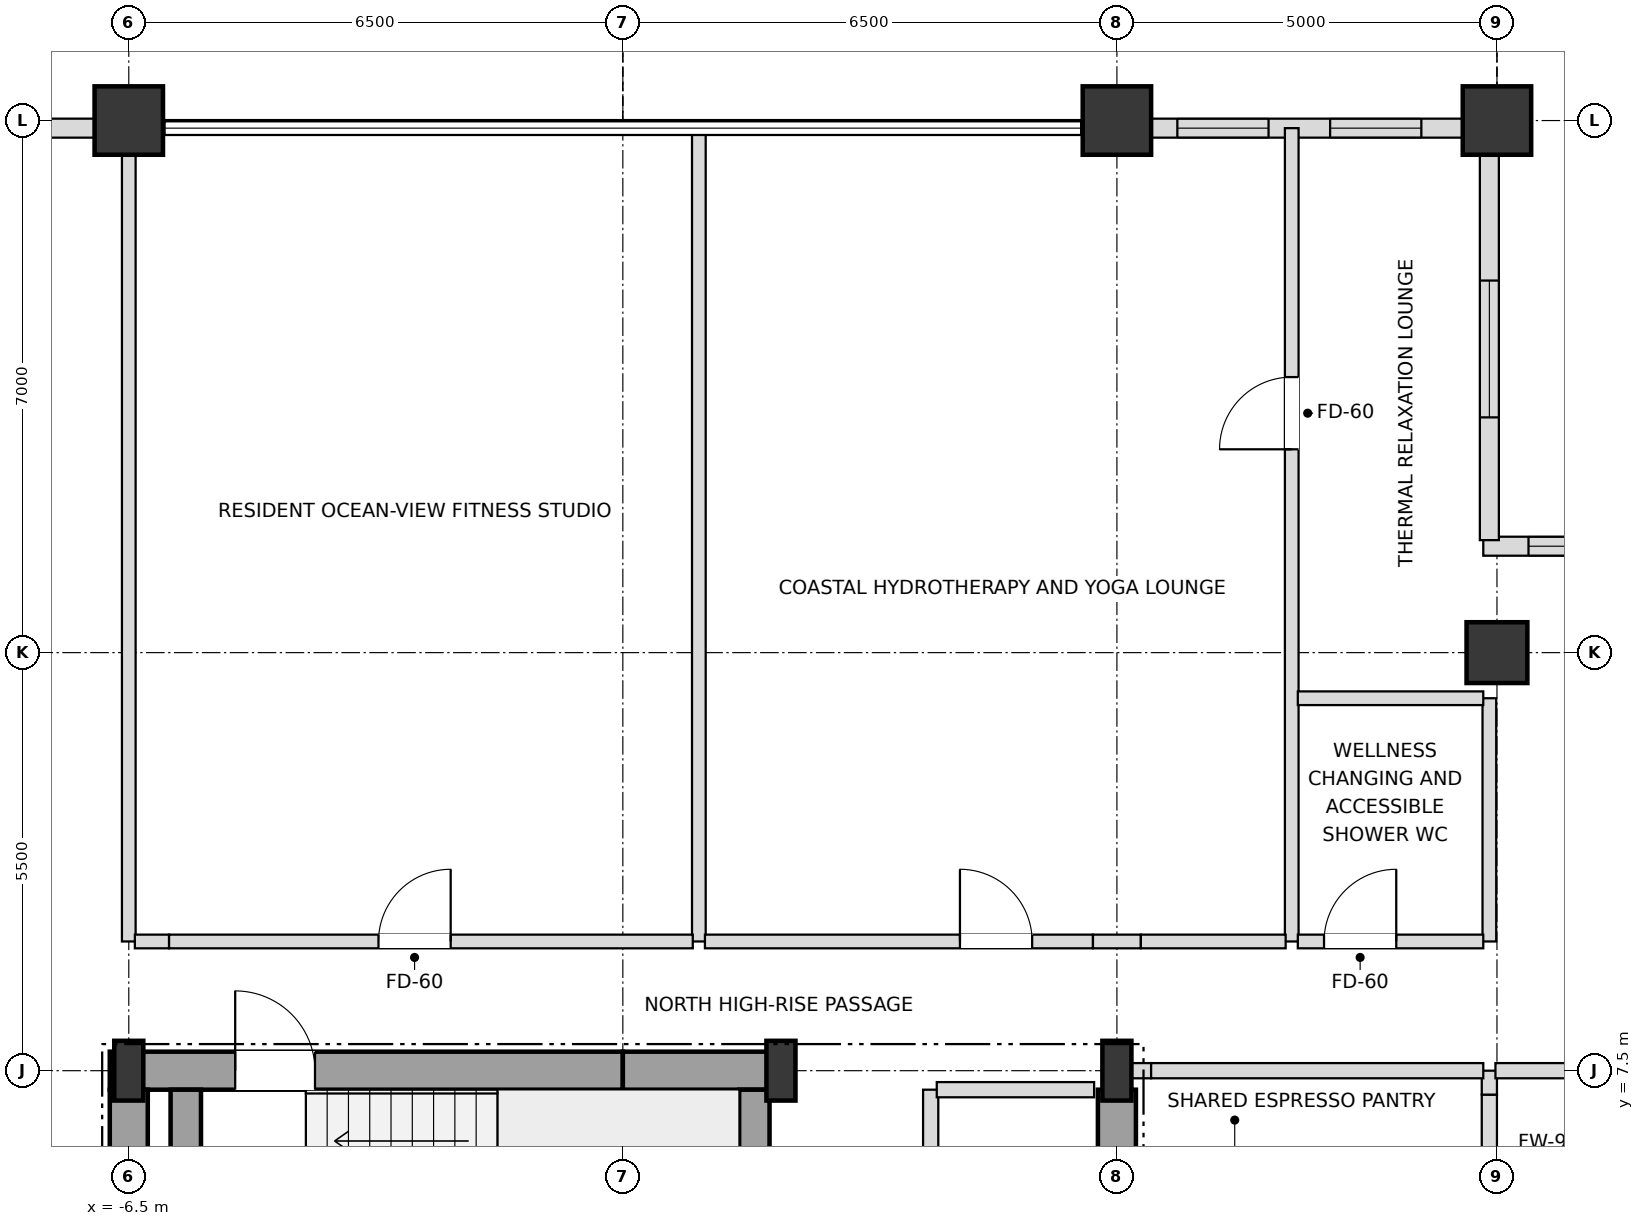
"""IFC4 building model, lengths in metres.
Left out: names, types, materials, properties, quantities, classifications, styles, units other than length and angle.
Written with IfcOpenShell. Run it as: python <this file> out.ifc"""

import sys

from ifc_helpers import new_model, si_unit, direction, frame, frame_2d, origin, origin_2d, place, context, subcontext, project, spatial, rectangle, i_section, extrude, element, fill, save


model = new_model("IFC4")
c1 = context("Model", 3, precision=1e-05, world=origin(), true_north=direction((0.0, 1.0)))
c2 = subcontext(c1, "Body", "Model", "MODEL_VIEW")
j1 = project(units=[si_unit("LENGTHUNIT", "METRE"), si_unit("PLANEANGLEUNIT", "RADIAN")], contexts=[c1])
p1 = place(None, origin())
s1 = spatial("IfcSite", under=j1, at=p1, CompositionType="ELEMENT")
p2 = place(p1, origin())
s2 = spatial("IfcBuilding", under=s1, at=p2, CompositionType="ELEMENT")
p3 = place(p2, frame((0.0, 0.0, 301.5)))
s3 = spatial("IfcBuildingStorey", under=s2, at=p3, CompositionType="ELEMENT", Elevation=301.5)
for number, where, z_axis, x_axis in (
    (1, (-6.5, 7.5, 0.0), (0.0, 0.0, 1.0), (1.0, 0.0, 0.0)),
    (2, (2.08, 7.5, 0.0), (0.0, 0.0, 1.0), (1.0, 0.0, 0.0)),
    (3, (6.5, 7.5, 0.0), (0.0, 0.0, 1.0), (1.0, 0.0, 0.0)),
):
    element("IfcColumn", number, at=place(p3, frame(where, z_axis=z_axis, x_axis=x_axis)), inside=s3, PredefinedType="COLUMN", context=c2, shape_type="SweptSolid", body=[
        extrude(i_section(OverallWidth=0.382, OverallDepth=0.786, WebThickness=0.02, FlangeThickness=0.033, at=origin_2d()), origin(), (0.0, 0.0, 1.0), 3.6),
    ])
for number, where, z_axis, x_axis in (
    (4, (11.5, 20.0, 0.0), (0.0, 0.0, 1.0), (1.0, 0.0, 0.0)),
    (5, (6.5, 20.0, 0.0), (0.0, 0.0, 1.0), (1.0, 0.0, 0.0)),
    (6, (-6.5, 20.0, 0.0), (0.0, 0.0, 1.0), (1.0, 0.0, 0.0)),
):
    element("IfcColumn", number, at=place(p3, frame(where, z_axis=z_axis, x_axis=x_axis)), inside=s3, PredefinedType="USERDEFINED", context=c2, shape_type="SweptSolid", body=[
        extrude(rectangle(XDim=0.9, YDim=0.9, at=origin_2d()), origin(), (0.0, 0.0, 1.0), 3.6),
    ])
p4 = place(p3, frame((11.5, 13.0, 0.0), z_axis=(0.0, 0.0, 1.0), x_axis=(1.0, 0.0, 0.0)))
e7 = element("IfcColumn", 7, at=p4, inside=s3, PredefinedType="COLUMN", context=c2, shape_type="SweptSolid", body=[
    extrude(rectangle(XDim=0.8, YDim=0.8, at=origin_2d()), origin(), (0.0, 0.0, 1.0), 3.6),
])
p5 = place(p3, frame((11.055, 19.9, 0.0), z_axis=(0.0, 0.0, 1.0), x_axis=(-1.0, 0.0, 0.0)))
e8 = element("IfcWall", 8, at=p5, inside=s3, PredefinedType="SOLIDWALL", context=c2, shape_type="SweptSolid", body=[
    extrude(rectangle(XDim=4.11, YDim=0.25, at=frame_2d((2.055, 0.0))), origin(), (0.0, 0.0, 1.0), 2.668),
])
p6 = place(p5, frame((0.55, 0.0, 0.72)))
e9 = element("IfcOpeningElement", 9, at=p6, cuts=e8, PredefinedType="OPENING", context=c2, shape_type="SweptSolid", body=[
    extrude(rectangle(XDim=1.2, YDim=1.68, at=frame_2d((0.6, 0.84))), frame((0.0, 0.135, 0.0), z_axis=(0.0, -1.0, 0.0), x_axis=(1.0, 0.0, 0.0)), (0.0, 0.0, 1.0), 0.27),
])
p7 = place(p5, frame((2.56, 0.0, 0.72)))
e10 = element("IfcOpeningElement", 10, at=p7, cuts=e8, PredefinedType="OPENING", context=c2, shape_type="SweptSolid", body=[
    extrude(rectangle(XDim=1.2, YDim=1.68, at=frame_2d((0.6, 0.84))), frame((0.0, 0.135, 0.0), z_axis=(0.0, -1.0, 0.0), x_axis=(1.0, 0.0, 0.0)), (0.0, 0.0, 1.0), 0.27),
])
p8 = place(p3, frame((-6.945, 19.9, 0.0), z_axis=(0.0, 0.0, 1.0), x_axis=(-1.0, 0.0, 0.0)))
e11 = element("IfcWall", 11, at=p8, inside=s3, PredefinedType="SOLIDWALL", context=c2, shape_type="SweptSolid", body=[
    extrude(rectangle(XDim=4.11, YDim=0.25, at=frame_2d((2.055, 0.0))), origin(), (0.0, 0.0, 1.0), 2.668),
])
p9 = place(p8, frame((1.155, 0.0, 0.72)))
e12 = element("IfcOpeningElement", 12, at=p9, cuts=e11, PredefinedType="OPENING", context=c2, shape_type="SweptSolid", body=[
    extrude(rectangle(XDim=1.8, YDim=1.68, at=frame_2d((0.9, 0.84))), frame((0.0, 0.135, 0.0), z_axis=(0.0, -1.0, 0.0), x_axis=(1.0, 0.0, 0.0)), (0.0, 0.0, 1.0), 0.27),
])
p10 = place(p3, frame((16.98, 14.4, 0.0), z_axis=(0.0, 0.0, 1.0), x_axis=(-1.0, 0.0, 0.0)))
e13 = element("IfcWall", 13, at=p10, inside=s3, PredefinedType="SOLIDWALL", context=c2, shape_type="SweptSolid", body=[
    extrude(rectangle(XDim=5.66, YDim=0.25, at=frame_2d((2.83, 0.0))), origin(), (0.0, 0.0, 1.0), 2.668),
])
p11 = place(p10, frame((0.595, 0.0, 0.72)))
e14 = element("IfcOpeningElement", 14, at=p11, cuts=e13, PredefinedType="OPENING", context=c2, shape_type="SweptSolid", body=[
    extrude(rectangle(XDim=1.8, YDim=1.68, at=frame_2d((0.9, 0.84))), frame((0.0, 0.135, 0.0), z_axis=(0.0, -1.0, 0.0), x_axis=(1.0, 0.0, 0.0)), (0.0, 0.0, 1.0), 0.27),
])
p12 = place(p10, frame((3.265, 0.0, 0.72)))
e15 = element("IfcOpeningElement", 15, at=p12, cuts=e13, PredefinedType="OPENING", context=c2, shape_type="SweptSolid", body=[
    extrude(rectangle(XDim=1.8, YDim=1.68, at=frame_2d((0.9, 0.84))), frame((0.0, 0.135, 0.0), z_axis=(0.0, -1.0, 0.0), x_axis=(1.0, 0.0, 0.0)), (0.0, 0.0, 1.0), 0.27),
])
p13 = place(p3, frame((11.4, 14.48, 0.0), z_axis=(0.0, 0.0, 1.0), x_axis=(0.0, 1.0, 0.0)))
e16 = element("IfcWall", 16, at=p13, inside=s3, PredefinedType="SOLIDWALL", context=c2, shape_type="SweptSolid", body=[
    extrude(rectangle(XDim=5.34, YDim=0.25, at=frame_2d((2.67, 0.0))), origin(), (0.0, 0.0, 1.0), 2.668),
])
p14 = place(p13, frame((1.615, 0.0, 0.72)))
e17 = element("IfcOpeningElement", 17, at=p14, cuts=e16, PredefinedType="OPENING", context=c2, shape_type="SweptSolid", body=[
    extrude(rectangle(XDim=1.8, YDim=1.68, at=frame_2d((0.9, 0.84))), frame((0.0, 0.135, 0.0), z_axis=(0.0, -1.0, 0.0), x_axis=(1.0, 0.0, 0.0)), (0.0, 0.0, 1.0), 0.27),
])
p15 = place(p3, frame((-6.75, 7.5, 0.0), z_axis=(0.0, 0.0, 1.0), x_axis=(1.0, 0.0, 0.0)))
e18 = element("IfcWall", 18, at=p15, inside=s3, PredefinedType="SHEAR", context=c2, shape_type="SweptSolid", body=[
    extrude(rectangle(XDim=6.75, YDim=0.5, at=frame_2d((3.375, 0.0))), origin(), (0.0, 0.0, 1.0), 3.3),
])
p16 = place(p15, frame((1.65, 0.0, 0.0)))
e19 = element("IfcOpeningElement", 19, at=p16, cuts=e18, PredefinedType="OPENING", context=c2, shape_type="SweptSolid", body=[
    extrude(rectangle(XDim=1.05, YDim=2.15, at=frame_2d((0.525, 1.075))), frame((0.0, 0.26, 0.0), z_axis=(0.0, -1.0, 0.0), x_axis=(1.0, 0.0, 0.0)), (0.0, 0.0, 1.0), 0.52),
])
p17 = place(p3, frame((0.0, 7.5, 0.0), z_axis=(0.0, 0.0, 1.0), x_axis=(1.0, 0.0, 0.0)))
e20 = element("IfcWall", 20, at=p17, inside=s3, PredefinedType="SHEAR", context=c2, shape_type="SweptSolid", body=[
    extrude(rectangle(XDim=2.08, YDim=0.5, at=frame_2d((1.04, 0.0))), origin(), (0.0, 0.0, 1.0), 3.3),
])
for number, where, z_axis, x_axis in (
    (21, (-6.5, 3.95, 0.0), (0.0, 0.0, 1.0), (0.0, 1.0, 0.0)),
    (22, (6.5, 3.95, 0.0), (0.0, 0.0, 1.0), (0.0, 1.0, 0.0)),
):
    element("IfcWall", number, at=place(p3, frame(where, z_axis=z_axis, x_axis=x_axis)), inside=s3, PredefinedType="SHEAR", context=c2, shape_type="SweptSolid", body=[
        extrude(rectangle(XDim=3.3, YDim=0.5, at=frame_2d((1.65, 0.0))), origin(), (0.0, 0.0, 1.0), 3.3),
    ])
for number, where, z_axis, x_axis in (
    (23, (1.73, 3.95, 0.0), (0.0, 0.0, 1.0), (0.0, 1.0, 0.0)),
    (24, (-5.75, 3.95, 0.0), (0.0, 0.0, 1.0), (0.0, 1.0, 0.0)),
):
    element("IfcWall", number, at=place(p3, frame(where, z_axis=z_axis, x_axis=x_axis)), inside=s3, PredefinedType="SHEAR", context=c2, shape_type="SweptSolid", body=[
        extrude(rectangle(XDim=3.3, YDim=0.4, at=frame_2d((1.65, 0.0))), origin(), (0.0, 0.0, 1.0), 3.3),
    ])
p18 = place(p3, frame((-6.5, 9.2, 0.0), z_axis=(0.0, 0.0, 1.0), x_axis=(0.0, 1.0, 0.0)))
e25 = element("IfcWall", 25, at=p18, inside=s3, PredefinedType="PARTITIONING", context=c2, shape_type="SweptSolid", body=[
    extrude(rectangle(XDim=10.7, YDim=0.18, at=frame_2d((5.35, 0.0))), origin(), (0.0, 0.0, 1.0), 1.485),
])
p19 = place(p3, frame((1.0, 9.2, 0.0), z_axis=(0.0, 0.0, 1.0), x_axis=(0.0, 1.0, 0.0)))
e26 = element("IfcWall", 26, at=p19, inside=s3, PredefinedType="PARTITIONING", context=c2, shape_type="SweptSolid", body=[
    extrude(rectangle(XDim=10.7, YDim=0.18, at=frame_2d((5.35, 0.0))), origin(), (0.0, 0.0, 1.0), 3.3),
])
p20 = place(p3, frame((4.05, 4.2, 0.0), z_axis=(0.0, 0.0, 1.0), x_axis=(0.0, 1.0, 0.0)))
e27 = element("IfcWall", 27, at=p20, inside=s3, PredefinedType="SOLIDWALL", context=c2, shape_type="SweptSolid", body=[
    extrude(rectangle(XDim=3.05, YDim=0.2, at=frame_2d((1.525, 0.0))), origin(), (0.0, 0.0, 1.0), 3.3),
])
p21 = place(p20, frame((0.975, 0.0, 0.0)))
e28 = element("IfcOpeningElement", 28, at=p21, cuts=e27, PredefinedType="OPENING", context=c2, shape_type="SweptSolid", body=[
    extrude(rectangle(XDim=0.95, YDim=2.15, at=frame_2d((0.475, 1.075))), frame((0.0, 0.11, 0.0), z_axis=(0.0, -1.0, 0.0), x_axis=(1.0, 0.0, 0.0)), (0.0, 0.0, 1.0), 0.22),
])
p22 = place(p3, frame((8.8, 9.2, 0.0), z_axis=(0.0, 0.0, 1.0), x_axis=(0.0, 1.0, 0.0)))
e29 = element("IfcWall", 29, at=p22, inside=s3, PredefinedType="PARTITIONING", context=c2, shape_type="SweptSolid", body=[
    extrude(rectangle(XDim=10.7, YDim=0.18, at=frame_2d((5.35, 0.0))), origin(), (0.0, 0.0, 1.0), 2.353),
])
p23 = place(p22, frame((6.475, 0.0, 0.0)))
e30 = element("IfcOpeningElement", 30, at=p23, cuts=e29, PredefinedType="OPENING", context=c2, shape_type="SweptSolid", body=[
    extrude(rectangle(XDim=0.95, YDim=2.15, at=frame_2d((0.475, 1.075))), frame((0.0, 0.1, 0.0), z_axis=(0.0, -1.0, 0.0), x_axis=(1.0, 0.0, 0.0)), (0.0, 0.0, 1.0), 0.2),
])
p24 = place(p3, frame((11.4, 4.5, 0.0), z_axis=(0.0, 0.0, 1.0), x_axis=(0.0, 1.0, 0.0)))
e31 = element("IfcWall", 31, at=p24, inside=s3, PredefinedType="SOLIDWALL", context=c2, shape_type="SweptSolid", body=[
    extrude(rectangle(XDim=2.685, YDim=0.2, at=frame_2d((1.343, 0.0))), origin(), (0.0, 0.0, 1.0), 2.968),
])
p25 = place(p3, frame((11.4, 7.185, 0.0), z_axis=(0.0, 0.0, 1.0), x_axis=(0.0, 1.0, 0.0)))
e32 = element("IfcWall", 32, at=p25, inside=s3, PredefinedType="SOLIDWALL", context=c2, shape_type="SweptSolid", body=[
    extrude(rectangle(XDim=0.315, YDim=0.2, at=frame_2d((0.157, 0.0))), origin(), (0.0, 0.0, 1.0), 1.485),
])
p26 = place(p3, frame((11.4, 9.2, 0.0), z_axis=(0.0, 0.0, 1.0), x_axis=(0.0, 1.0, 0.0)))
e33 = element("IfcWall", 33, at=p26, inside=s3, PredefinedType="PARTITIONING", context=c2, shape_type="SweptSolid", body=[
    extrude(rectangle(XDim=3.2, YDim=0.18, at=frame_2d((1.6, 0.0))), origin(), (0.0, 0.0, 1.0), 3.3),
])
p27 = place(p3, frame((4.13, 7.25, 0.0), z_axis=(0.0, 0.0, 1.0), x_axis=(1.0, 0.0, 0.0)))
e34 = element("IfcWall", 34, at=p27, inside=s3, PredefinedType="SOLIDWALL", context=c2, shape_type="SweptSolid", body=[
    extrude(rectangle(XDim=2.07, YDim=0.2, at=frame_2d((1.035, 0.0))), origin(), (0.0, 0.0, 1.0), 2.353),
])
p28 = place(p3, frame((6.5, 7.5, 0.0), z_axis=(0.0, 0.0, 1.0), x_axis=(1.0, 0.0, 0.0)))
e35 = element("IfcWall", 35, at=p28, inside=s3, PredefinedType="SOLIDWALL", context=c2, shape_type="SweptSolid", body=[
    extrude(rectangle(XDim=0.45, YDim=0.2, at=frame_2d((0.225, 0.0))), origin(), (0.0, 0.0, 1.0), 1.485),
])
p29 = place(p3, frame((6.95, 7.5, 0.0), z_axis=(0.0, 0.0, 1.0), x_axis=(1.0, 0.0, 0.0)))
e36 = element("IfcWall", 36, at=p29, inside=s3, PredefinedType="SOLIDWALL", context=c2, shape_type="SweptSolid", body=[
    extrude(rectangle(XDim=4.37, YDim=0.2, at=frame_2d((2.185, 0.0))), origin(), (0.0, 0.0, 1.0), 1.485),
])
p30 = place(p3, frame((11.48, 7.5, 0.0), z_axis=(0.0, 0.0, 1.0), x_axis=(1.0, 0.0, 0.0)))
e37 = element("IfcWall", 37, at=p30, inside=s3, PredefinedType="SOLIDWALL", context=c2, shape_type="SweptSolid", body=[
    extrude(rectangle(XDim=5.42, YDim=0.2, at=frame_2d((2.71, 0.0))), origin(), (0.0, 0.0, 1.0), 1.485),
])
p31 = place(p3, frame((-6.42, 9.2, 0.0), z_axis=(0.0, 0.0, 1.0), x_axis=(1.0, 0.0, 0.0)))
e38 = element("IfcWall", 38, at=p31, inside=s3, PredefinedType="PARTITIONING", context=c2, shape_type="SweptSolid", body=[
    extrude(rectangle(XDim=0.45, YDim=0.18, at=frame_2d((0.225, 0.0))), origin(), (0.0, 0.0, 1.0), 1.485),
])
p32 = place(p3, frame((-5.97, 9.2, 0.0), z_axis=(0.0, 0.0, 1.0), x_axis=(1.0, 0.0, 0.0)))
e39 = element("IfcWall", 39, at=p32, inside=s3, PredefinedType="PARTITIONING", context=c2, shape_type="SweptSolid", body=[
    extrude(rectangle(XDim=6.89, YDim=0.18, at=frame_2d((3.445, 0.0))), origin(), (0.0, 0.0, 1.0), 3.3),
])
p33 = place(p32, frame((2.755, 0.0, 0.0)))
e40 = element("IfcOpeningElement", 40, at=p33, cuts=e39, PredefinedType="OPENING", context=c2, shape_type="SweptSolid", body=[
    extrude(rectangle(XDim=0.95, YDim=2.15, at=frame_2d((0.475, 1.075))), frame((0.0, 0.1, 0.0), z_axis=(0.0, -1.0, 0.0), x_axis=(1.0, 0.0, 0.0)), (0.0, 0.0, 1.0), 0.2),
])
p34 = place(p3, frame((1.08, 9.2, 0.0), z_axis=(0.0, 0.0, 1.0), x_axis=(1.0, 0.0, 0.0)))
e41 = element("IfcWall", 41, at=p34, inside=s3, PredefinedType="PARTITIONING", context=c2, shape_type="SweptSolid", body=[
    extrude(rectangle(XDim=5.105, YDim=0.18, at=frame_2d((2.552, 0.0))), origin(), (0.0, 0.0, 1.0), 3.3),
])
p35 = place(p34, frame((3.355, 0.0, 0.0)))
e42 = element("IfcOpeningElement", 42, at=p35, cuts=e41, PredefinedType="OPENING", context=c2, shape_type="SweptSolid", body=[
    extrude(rectangle(XDim=0.95, YDim=2.15, at=frame_2d((0.475, 1.075))), frame((0.0, 0.1, 0.0), z_axis=(0.0, -1.0, 0.0), x_axis=(1.0, 0.0, 0.0)), (0.0, 0.0, 1.0), 0.2),
])
p36 = place(p3, frame((6.185, 9.2, 0.0), z_axis=(0.0, 0.0, 1.0), x_axis=(1.0, 0.0, 0.0)))
e43 = element("IfcWall", 43, at=p36, inside=s3, PredefinedType="PARTITIONING", context=c2, shape_type="SweptSolid", body=[
    extrude(rectangle(XDim=0.63, YDim=0.18, at=frame_2d((0.315, 0.0))), origin(), (0.0, 0.0, 1.0), 1.485),
])
p37 = place(p3, frame((6.815, 9.2, 0.0), z_axis=(0.0, 0.0, 1.0), x_axis=(1.0, 0.0, 0.0)))
e44 = element("IfcWall", 44, at=p37, inside=s3, PredefinedType="PARTITIONING", context=c2, shape_type="SweptSolid", body=[
    extrude(rectangle(XDim=1.905, YDim=0.18, at=frame_2d((0.953, 0.0))), origin(), (0.0, 0.0, 1.0), 3.3),
])
p38 = place(p3, frame((8.88, 9.2, 0.0), z_axis=(0.0, 0.0, 1.0), x_axis=(1.0, 0.0, 0.0)))
e45 = element("IfcWall", 45, at=p38, inside=s3, PredefinedType="PARTITIONING", context=c2, shape_type="SweptSolid", body=[
    extrude(rectangle(XDim=2.44, YDim=0.18, at=frame_2d((1.22, 0.0))), origin(), (0.0, 0.0, 1.0), 3.3),
])
p39 = place(p38, frame((0.345, 0.0, 0.0)))
e46 = element("IfcOpeningElement", 46, at=p39, cuts=e45, PredefinedType="OPENING", context=c2, shape_type="SweptSolid", body=[
    extrude(rectangle(XDim=0.95, YDim=2.15, at=frame_2d((0.475, 1.075))), frame((0.0, 0.1, 0.0), z_axis=(0.0, -1.0, 0.0), x_axis=(1.0, 0.0, 0.0)), (0.0, 0.0, 1.0), 0.2),
])
p40 = place(p3, frame((8.88, 12.4, 0.0), z_axis=(0.0, 0.0, 1.0), x_axis=(1.0, 0.0, 0.0)))
e47 = element("IfcWall", 47, at=p40, inside=s3, PredefinedType="PARTITIONING", context=c2, shape_type="SweptSolid", body=[
    extrude(rectangle(XDim=2.44, YDim=0.18, at=frame_2d((1.22, 0.0))), origin(), (0.0, 0.0, 1.0), 3.3),
])
p41 = place(p6, origin())
e48 = element("IfcWindow", 48, at=p41, inside=s3, PartitioningType="SINGLE_PANEL", PredefinedType="WINDOW", context=c2, shape_type="SweptSolid", body=[
    extrude(rectangle(XDim=1.2, YDim=1.68, at=frame_2d((0.6, 0.84))), frame((0.0, 0.03, 0.0), z_axis=(0.0, -1.0, 0.0), x_axis=(1.0, 0.0, 0.0)), (0.0, 0.0, 1.0), 0.06),
])
fill(e9, e48)
p42 = place(p7, origin())
e49 = element("IfcWindow", 49, at=p42, inside=s3, PartitioningType="SINGLE_PANEL", PredefinedType="WINDOW", context=c2, shape_type="SweptSolid", body=[
    extrude(rectangle(XDim=1.2, YDim=1.68, at=frame_2d((0.6, 0.84))), frame((0.0, 0.03, 0.0), z_axis=(0.0, -1.0, 0.0), x_axis=(1.0, 0.0, 0.0)), (0.0, 0.0, 1.0), 0.06),
])
fill(e10, e49)
p43 = place(p12, origin())
e50 = element("IfcWindow", 50, at=p43, inside=s3, PartitioningType="SINGLE_PANEL", PredefinedType="WINDOW", context=c2, shape_type="SweptSolid", body=[
    extrude(rectangle(XDim=1.8, YDim=1.68, at=frame_2d((0.9, 0.84))), frame((0.0, 0.03, 0.0), z_axis=(0.0, -1.0, 0.0), x_axis=(1.0, 0.0, 0.0)), (0.0, 0.0, 1.0), 0.06),
])
fill(e15, e50)
p44 = place(p14, origin())
e51 = element("IfcWindow", 51, at=p44, inside=s3, PartitioningType="SINGLE_PANEL", PredefinedType="WINDOW", context=c2, shape_type="SweptSolid", body=[
    extrude(rectangle(XDim=1.8, YDim=1.68, at=frame_2d((0.9, 0.84))), frame((0.0, 0.03, 0.0), z_axis=(0.0, -1.0, 0.0), x_axis=(1.0, 0.0, 0.0)), (0.0, 0.0, 1.0), 0.06),
])
fill(e17, e51)
p45 = place(p16, origin())
e52 = element("IfcDoor", 52, at=p45, inside=s3, OperationType="SINGLE_SWING_LEFT", PredefinedType="DOOR", context=c2, shape_type="SweptSolid", body=[
    extrude(rectangle(XDim=1.05, YDim=2.15, at=frame_2d((0.525, 1.075))), frame((0.0, 0.025, 0.0), z_axis=(0.0, -1.0, 0.0), x_axis=(1.0, 0.0, 0.0)), (0.0, 0.0, 1.0), 0.05),
])
fill(e19, e52)
p46 = place(p39, origin())
e53 = element("IfcDoor", 53, at=p46, inside=s3, OperationType="SINGLE_SWING_RIGHT", PredefinedType="DOOR", context=c2, shape_type="SweptSolid", body=[
    extrude(rectangle(XDim=0.95, YDim=2.15, at=frame_2d((0.475, 1.075))), frame((0.0, 0.025, 0.0), z_axis=(0.0, -1.0, 0.0), x_axis=(1.0, 0.0, 0.0)), (0.0, 0.0, 1.0), 0.05),
])
fill(e46, e53)
p47 = place(p23, origin())
e54 = element("IfcDoor", 54, at=p47, inside=s3, OperationType="SINGLE_SWING_LEFT", PredefinedType="DOOR", context=c2, shape_type="SweptSolid", body=[
    extrude(rectangle(XDim=0.95, YDim=2.15, at=frame_2d((0.475, 1.075))), frame((0.0, 0.025, 0.0), z_axis=(0.0, -1.0, 0.0), x_axis=(1.0, 0.0, 0.0)), (0.0, 0.0, 1.0), 0.05),
])
fill(e30, e54)
p48 = place(p33, origin())
e55 = element("IfcDoor", 55, at=p48, inside=s3, OperationType="SINGLE_SWING_RIGHT", PredefinedType="DOOR", context=c2, shape_type="SweptSolid", body=[
    extrude(rectangle(XDim=0.95, YDim=2.15, at=frame_2d((0.475, 1.075))), frame((0.0, 0.025, 0.0), z_axis=(0.0, -1.0, 0.0), x_axis=(1.0, 0.0, 0.0)), (0.0, 0.0, 1.0), 0.05),
])
fill(e40, e55)
p49 = place(p35, origin())
e56 = element("IfcDoor", 56, at=p49, inside=s3, OperationType="SINGLE_SWING_LEFT", PredefinedType="DOOR", context=c2, shape_type="SweptSolid", body=[
    extrude(rectangle(XDim=0.95, YDim=2.15, at=frame_2d((0.475, 1.075))), frame((0.0, 0.025, 0.0), z_axis=(0.0, -1.0, 0.0), x_axis=(1.0, 0.0, 0.0)), (0.0, 0.0, 1.0), 0.05),
])
fill(e42, e56)
save(model, sys.argv[1])
